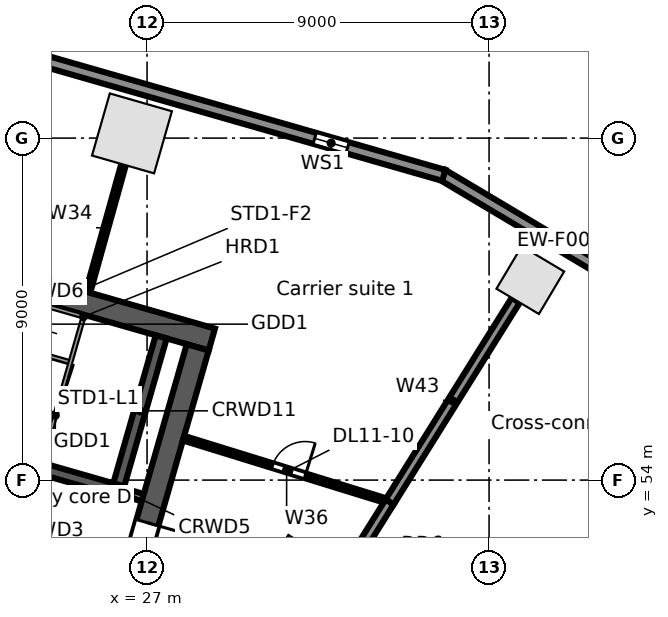
"""IFC4 building model, lengths in metres.
Left out: names, types, materials, properties, quantities, classifications, styles, units other than length and angle.
Written with IfcOpenShell. Run it as: python <this file> out.ifc"""

import sys

from ifc_helpers import new_model, si_unit, direction, frame, frame_2d, origin, origin_2d, place, context, subcontext, project, spatial, rectangle, extrude, element, fill, save


model = new_model("IFC4")
c1 = context("Model", 3, precision=1e-05, world=origin(), true_north=direction((0.0, 1.0)))
c2 = subcontext(c1, "Body", "Model", "MODEL_VIEW")
j1 = project(units=[si_unit("LENGTHUNIT", "METRE"), si_unit("PLANEANGLEUNIT", "RADIAN")], contexts=[c1])
p1 = place(None, origin())
s1 = spatial("IfcSite", under=j1, at=p1, CompositionType="ELEMENT")
p2 = place(p1, origin())
s2 = spatial("IfcBuilding", under=s1, at=p2, CompositionType="ELEMENT")
p3 = place(p2, frame((0.0, 0.0, 66.5)))
s3 = spatial("IfcBuildingStorey", under=s2, at=p3, CompositionType="ELEMENT", Elevation=66.5)
p4 = place(p3, frame((37.085, 59.262, 0.0), z_axis=(0.0, 0.0, 1.0), x_axis=(-0.859406411501, 0.511293086077, 0.0)))
e1 = element("IfcColumn", 1, at=p4, inside=s3, PredefinedType="COLUMN", context=c2, shape_type="SweptSolid", body=[
    extrude(rectangle(XDim=1.3, YDim=1.3, at=origin_2d()), origin(), (0.0, 0.0, 1.0), 5.0),
])
for number, where, z_axis, x_axis in (
    (2, (26.603, 63.124, 0.0), (0.0, 0.0, 1.0), (-0.961, 0.276, 0.0)),
    (3, (30.99, 51.386, 0.0), (0.0, 0.0, 1.0), (0.53, 0.848, 0.0)),
):
    element("IfcColumn", number, at=place(p3, frame(where, z_axis=z_axis, x_axis=x_axis)), inside=s3, PredefinedType="COLUMN", context=c2, shape_type="SweptSolid", body=[
        extrude(rectangle(XDim=1.7, YDim=1.7, at=origin_2d()), origin(), (0.0, 0.0, 1.0), 5.0),
    ])
p5 = place(p3, frame((34.773, 62.034, 0.0), z_axis=(0.0, 0.0, 1.0), x_axis=(0.859401317772, -0.511301647769, 0.0)))
e4 = element("IfcWall", 4, at=p5, inside=s3, PredefinedType="STANDARD", context=c2, shape_type="SweptSolid", body=[
    extrude(rectangle(XDim=6.808, YDim=0.3, at=frame_2d((3.404, 0.0))), origin(), (0.0, 0.0, 1.0), 4.68),
])
p6 = place(p3, frame((3.335, 71.044, 0.0), z_axis=(0.0, 0.0, 1.0), x_axis=(0.961260130989, -0.275642813387, 0.0)))
e5 = element("IfcWall", 5, at=p6, inside=s3, PredefinedType="STANDARD", context=c2, shape_type="SweptSolid", body=[
    extrude(rectangle(XDim=32.741, YDim=0.3, at=frame_2d((16.371, 0.0))), origin(), (0.0, 0.0, 1.0), 4.68),
])
p7 = place(p6, frame((29.207, 0.0, 0.6)))
e6 = element("IfcOpeningElement", 6, at=p7, cuts=e5, PredefinedType="OPENING", context=c2, shape_type="SweptSolid", body=[
    extrude(rectangle(XDim=0.9, YDim=3.2, at=frame_2d((0.45, 1.6))), frame((0.0, 0.16, 0.0), z_axis=(0.0, -1.0, 0.0), x_axis=(1.0, 0.0, 0.0)), (0.0, 0.0, 1.0), 0.32),
])
p8 = place(p6, frame((21.034, 0.0, 0.6)))
e7 = element("IfcOpeningElement", 7, at=p8, cuts=e5, PredefinedType="OPENING", context=c2, shape_type="SweptSolid", body=[
    extrude(rectangle(XDim=0.9, YDim=3.2, at=frame_2d((0.45, 1.6))), frame((0.0, 0.16, 0.0), z_axis=(0.0, -1.0, 0.0), x_axis=(1.0, 0.0, 0.0)), (0.0, 0.0, 1.0), 0.32),
])
p9 = place(p6, frame((12.861, 0.0, 0.6)))
e8 = element("IfcOpeningElement", 8, at=p9, cuts=e5, PredefinedType="OPENING", context=c2, shape_type="SweptSolid", body=[
    extrude(rectangle(XDim=0.9, YDim=3.2, at=frame_2d((0.45, 1.6))), frame((0.0, 0.16, 0.0), z_axis=(0.0, -1.0, 0.0), x_axis=(1.0, 0.0, 0.0)), (0.0, 0.0, 1.0), 0.32),
])
p10 = place(p6, frame((4.688, 0.0, 0.6)))
e9 = element("IfcOpeningElement", 9, at=p10, cuts=e5, PredefinedType="OPENING", context=c2, shape_type="SweptSolid", body=[
    extrude(rectangle(XDim=0.9, YDim=3.2, at=frame_2d((0.45, 1.6))), frame((0.0, 0.16, 0.0), z_axis=(0.0, -1.0, 0.0), x_axis=(1.0, 0.0, 0.0)), (0.0, 0.0, 1.0), 0.32),
])
p11 = place(p3, frame((21.131, 52.692, 0.0), z_axis=(0.0, 0.0, 1.0), x_axis=(0.961271492568, -0.275603188616, 0.0)))
e10 = element("IfcWall", 10, at=p11, inside=s3, PredefinedType="SOLIDWALL", context=c2, shape_type="SweptSolid", body=[
    extrude(rectangle(XDim=5.3, YDim=0.3, at=frame_2d((2.65, 0.0))), origin(), (0.0, 0.0, 1.0), 4.68),
])
p12 = place(p11, frame((0.95, 0.0, 0.0)))
e11 = element("IfcOpeningElement", 11, at=p12, cuts=e10, PredefinedType="OPENING", context=c2, shape_type="SweptSolid", body=[
    extrude(rectangle(XDim=0.9, YDim=2.1, at=frame_2d((0.45, 1.05))), frame((0.0, 0.16, 0.0), z_axis=(0.0, -1.0, 0.0), x_axis=(1.0, 0.0, 0.0)), (0.0, 0.0, 1.0), 0.32),
])
p13 = place(p11, frame((3.75, 0.0, 0.0)))
e12 = element("IfcOpeningElement", 12, at=p13, cuts=e10, PredefinedType="OPENING", context=c2, shape_type="SweptSolid", body=[
    extrude(rectangle(XDim=0.9, YDim=2.1, at=frame_2d((0.45, 1.05))), frame((0.0, 0.16, 0.0), z_axis=(0.0, -1.0, 0.0), x_axis=(1.0, 0.0, 0.0)), (0.0, 0.0, 1.0), 0.32),
])
p14 = place(p3, frame((19.389, 55.689, 0.0), z_axis=(0.0, 0.0, 1.0), x_axis=(0.961261397636, -0.275638396117, 0.0)))
e13 = element("IfcWall", 13, at=p14, inside=s3, PredefinedType="SOLIDWALL", context=c2, shape_type="SweptSolid", body=[
    extrude(rectangle(XDim=7.1, YDim=0.3, at=frame_2d((3.55, 0.0))), origin(), (0.0, 0.0, 1.0), 4.68),
])
p15 = place(p14, frame((0.2, 0.0, 0.0)))
e14 = element("IfcOpeningElement", 14, at=p15, cuts=e13, PredefinedType="OPENING", context=c2, shape_type="SweptSolid", body=[
    extrude(rectangle(XDim=1.0, YDim=2.1, at=frame_2d((0.5, 1.05))), frame((0.0, 0.16, 0.0), z_axis=(0.0, -1.0, 0.0), x_axis=(1.0, 0.0, 0.0)), (0.0, 0.0, 1.0), 0.32),
])
p16 = place(p3, frame((26.214, 53.732, 0.0), z_axis=(0.0, 0.0, 1.0), x_axis=(0.96122076476, -0.27578005982, 0.0)))
e15 = element("IfcWall", 15, at=p16, inside=s3, PredefinedType="SOLIDWALL", context=c2, shape_type="SweptSolid", body=[
    extrude(rectangle(XDim=0.7, YDim=0.2, at=frame_2d((0.35, 0.0))), origin(), (0.0, 0.0, 1.0), 4.68),
])
p17 = place(p3, frame((20.053, 60.18, 0.0), z_axis=(0.0, 0.0, 1.0), x_axis=(0.96126248289, -0.275634611374, 0.0)))
e16 = element("IfcWall", 16, at=p17, inside=s3, PredefinedType="SOLIDWALL", context=c2, shape_type="SweptSolid", body=[
    extrude(rectangle(XDim=9.0, YDim=0.6, at=frame_2d((4.5, 0.0))), origin(), (0.0, 0.0, 1.0), 4.68),
])
p18 = place(p3, frame((26.256, 53.876, 0.0), z_axis=(0.0, 0.0, 1.0), x_axis=(0.275612739511, 0.961268754209, 0.0)))
e17 = element("IfcWall", 17, at=p18, inside=s3, PredefinedType="SOLIDWALL", context=c2, shape_type="SweptSolid", body=[
    extrude(rectangle(XDim=4.05, YDim=0.3, at=frame_2d((2.025, 0.0))), origin(), (0.0, 0.0, 1.0), 4.68),
])
p19 = place(p3, frame((25.356, 47.112, 0.0), z_axis=(0.0, 0.0, 1.0), x_axis=(0.275631631629, 0.961263337304, 0.0)))
e18 = element("IfcWall", 18, at=p19, inside=s3, PredefinedType="SOLIDWALL", context=c2, shape_type="SweptSolid", body=[
    extrude(rectangle(XDim=10.8, YDim=0.6, at=frame_2d((5.4, 0.0))), origin(), (0.0, 0.0, 1.0), 4.68),
])
p20 = place(p19, frame((4.8, 0.0, 0.0)))
e19 = element("IfcOpeningElement", 19, at=p20, cuts=e18, PredefinedType="OPENING", context=c2, shape_type="SweptSolid", body=[
    extrude(rectangle(XDim=1.2, YDim=2.1, at=frame_2d((0.6, 1.05))), frame((0.0, 0.31, 0.0), z_axis=(0.0, -1.0, 0.0), x_axis=(1.0, 0.0, 0.0)), (0.0, 0.0, 1.0), 0.62),
])
p21 = place(p3, frame((25.445, 58.946, 0.0), z_axis=(0.0, 0.0, 1.0), x_axis=(0.268850353538, 0.963181959654, 0.0)))
e20 = element("IfcWall", 20, at=p21, inside=s3, PredefinedType="PARTITIONING", context=c2, shape_type="SweptSolid", body=[
    extrude(rectangle(XDim=3.485, YDim=0.125, at=frame_2d((1.743, 0.0))), origin(), (0.0, 0.0, 1.0), 4.154),
])
p22 = place(p3, frame((27.96, 55.103, 0.0), z_axis=(0.0, 0.0, 1.0), x_axis=(0.955442775069, -0.29517639399, 0.0)))
e21 = element("IfcWall", 21, at=p22, inside=s3, PredefinedType="PARTITIONING", context=c2, shape_type="SweptSolid", body=[
    extrude(rectangle(XDim=5.678, YDim=0.125, at=frame_2d((2.839, 0.0))), origin(), (0.0, 0.0, 1.0), 3.748),
])
p23 = place(p22, frame((2.45, 0.0, 0.0)))
e22 = element("IfcOpeningElement", 22, at=p23, cuts=e21, PredefinedType="OPENING", context=c2, shape_type="SweptSolid", body=[
    extrude(rectangle(XDim=0.9, YDim=2.1, at=frame_2d((0.45, 1.05))), frame((0.0, 0.073, 0.0), z_axis=(0.0, -1.0, 0.0), x_axis=(1.0, 0.0, 0.0)), (0.0, 0.0, 1.0), 0.145),
])
p24 = place(p3, frame((29.675, 47.491, 0.0), z_axis=(0.0, 0.0, 1.0), x_axis=(0.529992669945, 0.848002222759, 0.0)))
e23 = element("IfcWall", 23, at=p24, inside=s3, PredefinedType="PARTITIONING", context=c2, shape_type="SweptSolid", body=[
    extrude(rectangle(XDim=7.0, YDim=0.25, at=frame_2d((3.5, 0.0))), origin(), (0.0, 0.0, 1.0), 3.742),
])
p25 = place(p3, frame((30.126, 41.882, 0.0), z_axis=(0.0, 0.0, 1.0), x_axis=(0.709029789155, 0.705178529233, 0.0)))
e24 = element("IfcWall", 24, at=p25, inside=s3, PredefinedType="PARTITIONING", context=c2, shape_type="SweptSolid", body=[
    extrude(rectangle(XDim=19.018, YDim=0.125, at=frame_2d((9.509, 0.0))), origin(), (0.0, 0.0, 1.0), 3.742),
])
p26 = place(p3, frame((33.385, 53.427, 0.0), z_axis=(0.0, 0.0, 1.0), x_axis=(0.529897235032, 0.848061861131, 0.0)))
e25 = element("IfcWall", 25, at=p26, inside=s3, PredefinedType="PARTITIONING", context=c2, shape_type="SweptSolid", body=[
    extrude(rectangle(XDim=6.258, YDim=0.25, at=frame_2d((3.129, 0.0))), origin(), (0.0, 0.0, 1.0), 3.742),
])
p27 = place(p7, origin())
e26 = element("IfcWindow", 26, at=p27, inside=s3, PartitioningType="SINGLE_PANEL", PredefinedType="WINDOW", context=c2, shape_type="SweptSolid", body=[
    extrude(rectangle(XDim=0.9, YDim=3.2, at=frame_2d((0.45, 1.6))), frame((0.0, 0.03, 0.0), z_axis=(0.0, -1.0, 0.0), x_axis=(1.0, 0.0, 0.0)), (0.0, 0.0, 1.0), 0.06),
])
fill(e6, e26)
p28 = place(p20, frame((1.2, 0.0, 0.0), z_axis=(0.0, 0.0, 1.0), x_axis=(-1.0, 0.0, 0.0)))
e27 = element("IfcDoor", 27, at=p28, inside=s3, OperationType="SINGLE_SWING_LEFT", PredefinedType="DOOR", context=c2, shape_type="SweptSolid", body=[
    extrude(rectangle(XDim=1.2, YDim=2.1, at=frame_2d((0.6, 1.05))), frame((0.0, 0.025, 0.0), z_axis=(0.0, -1.0, 0.0), x_axis=(1.0, 0.0, 0.0)), (0.0, 0.0, 1.0), 0.05),
])
fill(e19, e27)
p29 = place(p23, origin())
e28 = element("IfcDoor", 28, at=p29, inside=s3, OperationType="SINGLE_SWING_RIGHT", PredefinedType="DOOR", context=c2, shape_type="SweptSolid", body=[
    extrude(rectangle(XDim=0.9, YDim=2.1, at=frame_2d((0.45, 1.05))), frame((0.0, 0.025, 0.0), z_axis=(0.0, -1.0, 0.0), x_axis=(1.0, 0.0, 0.0)), (0.0, 0.0, 1.0), 0.05),
])
fill(e22, e28)
save(model, sys.argv[1])
